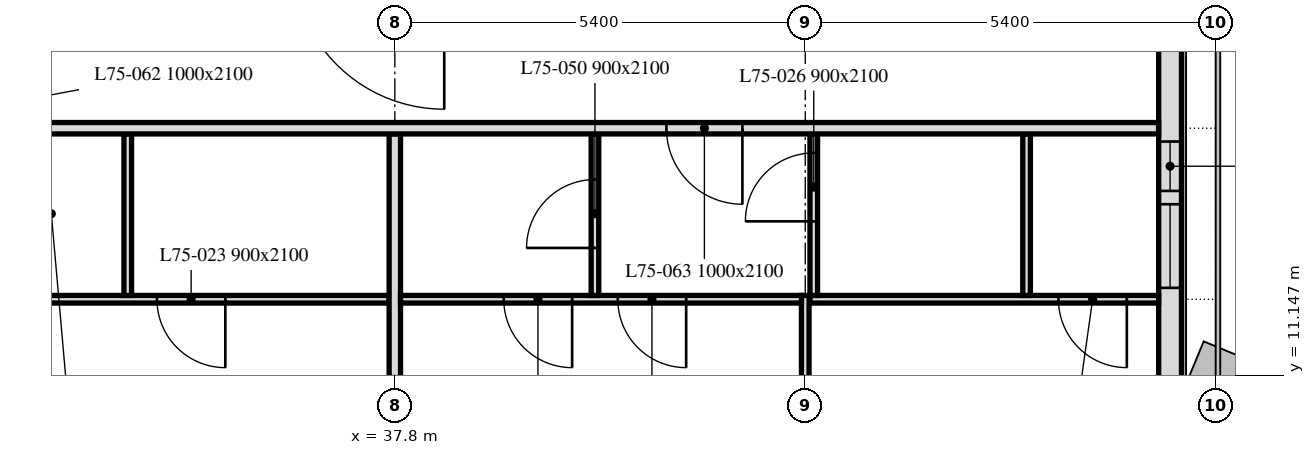
"""IFC4 building model, lengths in metres.
Left out: names, types, materials, properties, quantities, classifications, styles, units other than length and angle.
Written with IfcOpenShell. Run it as: python <this file> out.ifc"""

import sys

from ifc_helpers import new_model, si_unit, direction, frame, frame_2d, origin, place, context, subcontext, project, spatial, rectangle, extrude, element, fill, save


model = new_model("IFC4")
c1 = context("Model", 3, precision=1e-05, world=origin(), true_north=direction((0.0, 1.0)))
c2 = subcontext(c1, "Body", "Model", "MODEL_VIEW")
j1 = project(units=[si_unit("LENGTHUNIT", "METRE"), si_unit("PLANEANGLEUNIT", "RADIAN")], contexts=[c1])
p1 = place(None, origin())
s1 = spatial("IfcSite", under=j1, at=p1, CompositionType="ELEMENT")
p2 = place(p1, origin())
s2 = spatial("IfcBuilding", under=s1, at=p2, CompositionType="ELEMENT")
p3 = place(p2, frame((0.0, 0.0, 301.6)))
s3 = spatial("IfcBuildingStorey", under=s2, at=p3, CompositionType="ELEMENT", Elevation=301.6)
p4 = place(p3, frame((48.0, 10.986, 0.0), z_axis=(0.0, 0.0, 1.0), x_axis=(0.0, 1.0, 0.0)))
e1 = element("IfcWall", 1, at=p4, inside=s3, PredefinedType="SOLIDWALL", context=c2, shape_type="SweptSolid", body=[
    extrude(rectangle(XDim=32.027, YDim=0.3, at=frame_2d((16.014, 0.0))), origin(), (0.0, 0.0, 1.0), 3.0),
])
p5 = place(p4, frame((1.314, 0.0, 0.9)))
e2 = element("IfcOpeningElement", 2, at=p5, cuts=e1, PredefinedType="OPENING", context=c2, shape_type="SweptSolid", body=[
    extrude(rectangle(XDim=1.1, YDim=1.7, at=frame_2d((0.55, 0.85))), frame((0.0, 0.16, 0.0), z_axis=(0.0, -1.0, 0.0), x_axis=(1.0, 0.0, 0.0)), (0.0, 0.0, 1.0), 0.32),
])
p6 = place(p4, frame((2.589, 0.0, 0.9)))
e3 = element("IfcOpeningElement", 3, at=p6, cuts=e1, PredefinedType="OPENING", context=c2, shape_type="SweptSolid", body=[
    extrude(rectangle(XDim=0.65, YDim=1.7, at=frame_2d((0.325, 0.85))), frame((0.0, 0.16, 0.0), z_axis=(0.0, -1.0, 0.0), x_axis=(1.0, 0.0, 0.0)), (0.0, 0.0, 1.0), 0.32),
])
p7 = place(p4, frame((6.564, 0.0, 0.9)))
e4 = element("IfcOpeningElement", 4, at=p7, cuts=e1, PredefinedType="OPENING", context=c2, shape_type="SweptSolid", body=[
    extrude(rectangle(XDim=1.1, YDim=1.7, at=frame_2d((0.55, 0.85))), frame((0.0, 0.16, 0.0), z_axis=(0.0, -1.0, 0.0), x_axis=(1.0, 0.0, 0.0)), (0.0, 0.0, 1.0), 0.32),
])
p8 = place(p4, frame((8.164, 0.0, 0.9)))
e5 = element("IfcOpeningElement", 5, at=p8, cuts=e1, PredefinedType="OPENING", context=c2, shape_type="SweptSolid", body=[
    extrude(rectangle(XDim=1.1, YDim=1.7, at=frame_2d((0.55, 0.85))), frame((0.0, 0.16, 0.0), z_axis=(0.0, -1.0, 0.0), x_axis=(1.0, 0.0, 0.0)), (0.0, 0.0, 1.0), 0.32),
])
p9 = place(p4, frame((11.614, 0.0, 0.9)))
e6 = element("IfcOpeningElement", 6, at=p9, cuts=e1, PredefinedType="OPENING", context=c2, shape_type="SweptSolid", body=[
    extrude(rectangle(XDim=3.4, YDim=1.7, at=frame_2d((1.7, 0.85))), frame((0.0, 0.16, 0.0), z_axis=(0.0, -1.0, 0.0), x_axis=(1.0, 0.0, 0.0)), (0.0, 0.0, 1.0), 0.32),
])
p10 = place(p4, frame((17.364, 0.0, 0.9)))
e7 = element("IfcOpeningElement", 7, at=p10, cuts=e1, PredefinedType="OPENING", context=c2, shape_type="SweptSolid", body=[
    extrude(rectangle(XDim=1.1, YDim=1.7, at=frame_2d((0.55, 0.85))), frame((0.0, 0.16, 0.0), z_axis=(0.0, -1.0, 0.0), x_axis=(1.0, 0.0, 0.0)), (0.0, 0.0, 1.0), 0.32),
])
p11 = place(p4, frame((18.964, 0.0, 0.9)))
e8 = element("IfcOpeningElement", 8, at=p11, cuts=e1, PredefinedType="OPENING", context=c2, shape_type="SweptSolid", body=[
    extrude(rectangle(XDim=1.1, YDim=1.7, at=frame_2d((0.55, 0.85))), frame((0.0, 0.16, 0.0), z_axis=(0.0, -1.0, 0.0), x_axis=(1.0, 0.0, 0.0)), (0.0, 0.0, 1.0), 0.32),
])
p12 = place(p4, frame((23.389, 0.0, 0.9)))
e9 = element("IfcOpeningElement", 9, at=p12, cuts=e1, PredefinedType="OPENING", context=c2, shape_type="SweptSolid", body=[
    extrude(rectangle(XDim=0.65, YDim=1.7, at=frame_2d((0.325, 0.85))), frame((0.0, 0.16, 0.0), z_axis=(0.0, -1.0, 0.0), x_axis=(1.0, 0.0, 0.0)), (0.0, 0.0, 1.0), 0.32),
])
p13 = place(p4, frame((24.364, 0.0, 0.9)))
e10 = element("IfcOpeningElement", 10, at=p13, cuts=e1, PredefinedType="OPENING", context=c2, shape_type="SweptSolid", body=[
    extrude(rectangle(XDim=1.1, YDim=1.7, at=frame_2d((0.55, 0.85))), frame((0.0, 0.16, 0.0), z_axis=(0.0, -1.0, 0.0), x_axis=(1.0, 0.0, 0.0)), (0.0, 0.0, 1.0), 0.32),
])
p14 = place(p4, frame((28.164, 0.0, 0.9)))
e11 = element("IfcOpeningElement", 11, at=p14, cuts=e1, PredefinedType="OPENING", context=c2, shape_type="SweptSolid", body=[
    extrude(rectangle(XDim=1.1, YDim=1.7, at=frame_2d((0.55, 0.85))), frame((0.0, 0.16, 0.0), z_axis=(0.0, -1.0, 0.0), x_axis=(1.0, 0.0, 0.0)), (0.0, 0.0, 1.0), 0.32),
])
p15 = place(p4, frame((29.764, 0.0, 0.9)))
e12 = element("IfcOpeningElement", 12, at=p15, cuts=e1, PredefinedType="OPENING", context=c2, shape_type="SweptSolid", body=[
    extrude(rectangle(XDim=1.1, YDim=1.7, at=frame_2d((0.55, 0.85))), frame((0.0, 0.16, 0.0), z_axis=(0.0, -1.0, 0.0), x_axis=(1.0, 0.0, 0.0)), (0.0, 0.0, 1.0), 0.32),
])
p16 = place(p3, frame((37.725, 12.15, 0.0), z_axis=(0.0, 0.0, 1.0), x_axis=(-1.0, 0.0, 0.0)))
e13 = element("IfcWall", 13, at=p16, inside=s3, PredefinedType="PARTITIONING", context=c2, shape_type="SweptSolid", body=[
    extrude(rectangle(XDim=5.275, YDim=0.1, at=frame_2d((2.638, 0.0))), origin(), (0.0, 0.0, 1.0), 3.0),
])
p17 = place(p16, frame((2.155, 0.0, 0.0)))
e14 = element("IfcOpeningElement", 14, at=p17, cuts=e13, PredefinedType="OPENING", context=c2, shape_type="SweptSolid", body=[
    extrude(rectangle(XDim=0.9, YDim=2.1, at=frame_2d((0.45, 1.05))), frame((0.0, 0.05, 0.0), z_axis=(0.0, -1.0, 0.0), x_axis=(1.0, 0.0, 0.0)), (0.0, 0.0, 1.0), 0.1),
])
p18 = place(p3, frame((34.286, 12.2, 0.0), z_axis=(0.0, 0.0, 1.0), x_axis=(0.0, 1.0, 0.0)))
e15 = element("IfcWall", 15, at=p18, inside=s3, PredefinedType="PARTITIONING", context=c2, shape_type="SweptSolid", body=[
    extrude(rectangle(XDim=2.125, YDim=0.1, at=frame_2d((1.062, 0.0))), origin(), (0.0, 0.0, 1.0), 3.0),
])
p19 = place(p3, frame((37.8, 11.12, 0.0), z_axis=(0.0, 0.0, 1.0), x_axis=(0.0, 1.0, 0.0)))
e16 = element("IfcWall", 16, at=p19, inside=s3, PredefinedType="PARTITIONING", context=c2, shape_type="SweptSolid", body=[
    extrude(rectangle(XDim=3.205, YDim=0.15, at=frame_2d((1.603, 0.0))), origin(), (0.0, 0.0, 1.0), 3.0),
])
p20 = place(p3, frame((43.2, 11.12, 0.0), z_axis=(0.0, 0.0, 1.0), x_axis=(0.0, 1.0, 0.0)))
e17 = element("IfcWall", 17, at=p20, inside=s3, PredefinedType="PARTITIONING", context=c2, shape_type="SweptSolid", body=[
    extrude(rectangle(XDim=1.08, YDim=0.1, at=frame_2d((0.54, 0.0))), origin(), (0.0, 0.0, 1.0), 3.0),
])
p21 = place(p3, frame((43.15, 12.15, 0.0), z_axis=(0.0, 0.0, 1.0), x_axis=(-1.0, 0.0, 0.0)))
e18 = element("IfcWall", 18, at=p21, inside=s3, PredefinedType="PARTITIONING", context=c2, shape_type="SweptSolid", body=[
    extrude(rectangle(XDim=5.275, YDim=0.1, at=frame_2d((2.637, 0.0))), origin(), (0.0, 0.0, 1.0), 3.0),
])
p22 = place(p21, frame((3.017, 0.0, 0.0)))
e19 = element("IfcOpeningElement", 19, at=p22, cuts=e18, PredefinedType="OPENING", context=c2, shape_type="SweptSolid", body=[
    extrude(rectangle(XDim=0.9, YDim=2.1, at=frame_2d((0.45, 1.05))), frame((0.0, 0.05, 0.0), z_axis=(0.0, -1.0, 0.0), x_axis=(1.0, 0.0, 0.0)), (0.0, 0.0, 1.0), 0.1),
])
p23 = place(p21, frame((1.517, 0.0, 0.0)))
e20 = element("IfcOpeningElement", 20, at=p23, cuts=e18, PredefinedType="OPENING", context=c2, shape_type="SweptSolid", body=[
    extrude(rectangle(XDim=0.9, YDim=2.1, at=frame_2d((0.45, 1.05))), frame((0.0, 0.05, 0.0), z_axis=(0.0, -1.0, 0.0), x_axis=(1.0, 0.0, 0.0)), (0.0, 0.0, 1.0), 0.1),
])
p24 = place(p3, frame((47.849, 12.15, 0.0), z_axis=(0.0, 0.0, 1.0), x_axis=(-1.0, 0.0, 0.0)))
e21 = element("IfcWall", 21, at=p24, inside=s3, PredefinedType="PARTITIONING", context=c2, shape_type="SweptSolid", body=[
    extrude(rectangle(XDim=4.587, YDim=0.1, at=frame_2d((2.293, 0.0))), origin(), (0.0, 0.0, 1.0), 3.0),
])
p25 = place(p24, frame((0.418, 0.0, 0.0)))
e22 = element("IfcOpeningElement", 22, at=p25, cuts=e21, PredefinedType="OPENING", context=c2, shape_type="SweptSolid", body=[
    extrude(rectangle(XDim=0.9, YDim=2.1, at=frame_2d((0.45, 1.05))), frame((0.0, 0.05, 0.0), z_axis=(0.0, -1.0, 0.0), x_axis=(1.0, 0.0, 0.0)), (0.0, 0.0, 1.0), 0.1),
])
p26 = place(p3, frame((40.433, 12.2, 0.0), z_axis=(0.0, 0.0, 1.0), x_axis=(0.0, 1.0, 0.0)))
e23 = element("IfcWall", 23, at=p26, inside=s3, PredefinedType="PARTITIONING", context=c2, shape_type="SweptSolid", body=[
    extrude(rectangle(XDim=2.125, YDim=0.1, at=frame_2d((1.062, 0.0))), origin(), (0.0, 0.0, 1.0), 3.0),
])
p27 = place(p26, frame((0.625, 0.0, 0.0)))
e24 = element("IfcOpeningElement", 24, at=p27, cuts=e23, PredefinedType="OPENING", context=c2, shape_type="SweptSolid", body=[
    extrude(rectangle(XDim=0.9, YDim=2.1, at=frame_2d((0.45, 1.05))), frame((0.0, 0.05, 0.0), z_axis=(0.0, -1.0, 0.0), x_axis=(1.0, 0.0, 0.0)), (0.0, 0.0, 1.0), 0.1),
])
p28 = place(p3, frame((43.312, 12.2, 0.0), z_axis=(0.0, 0.0, 1.0), x_axis=(0.0, 1.0, 0.0)))
e25 = element("IfcWall", 25, at=p28, inside=s3, PredefinedType="PARTITIONING", context=c2, shape_type="SweptSolid", body=[
    extrude(rectangle(XDim=2.125, YDim=0.1, at=frame_2d((1.062, 0.0))), origin(), (0.0, 0.0, 1.0), 3.0),
])
p29 = place(p28, frame((0.975, 0.0, 0.0)))
e26 = element("IfcOpeningElement", 26, at=p29, cuts=e25, PredefinedType="OPENING", context=c2, shape_type="SweptSolid", body=[
    extrude(rectangle(XDim=0.9, YDim=2.1, at=frame_2d((0.45, 1.05))), frame((0.0, 0.05, 0.0), z_axis=(0.0, -1.0, 0.0), x_axis=(1.0, 0.0, 0.0)), (0.0, 0.0, 1.0), 0.1),
])
p30 = place(p3, frame((46.112, 12.2, 0.0), z_axis=(0.0, 0.0, 1.0), x_axis=(0.0, 1.0, 0.0)))
e27 = element("IfcWall", 27, at=p30, inside=s3, PredefinedType="PARTITIONING", context=c2, shape_type="SweptSolid", body=[
    extrude(rectangle(XDim=2.125, YDim=0.1, at=frame_2d((1.062, 0.0))), origin(), (0.0, 0.0, 1.0), 3.0),
])
p31 = place(p3, frame((47.849, 14.4, 0.0), z_axis=(0.0, 0.0, 1.0), x_axis=(-1.0, 0.0, 0.0)))
e28 = element("IfcWall", 28, at=p31, inside=s3, PredefinedType="PARTITIONING", context=c2, shape_type="SweptSolid", body=[
    extrude(rectangle(XDim=41.698, YDim=0.15, at=frame_2d((20.849, 0.0))), origin(), (0.0, 0.0, 1.0), 3.0),
])
p32 = place(p31, frame((38.179, 0.0, 0.0)))
e29 = element("IfcOpeningElement", 29, at=p32, cuts=e28, PredefinedType="OPENING", context=c2, shape_type="SweptSolid", body=[
    extrude(rectangle(XDim=1.0, YDim=2.1, at=frame_2d((0.5, 1.05))), frame((0.0, 0.075, 0.0), z_axis=(0.0, -1.0, 0.0), x_axis=(1.0, 0.0, 0.0)), (0.0, 0.0, 1.0), 0.15),
])
p33 = place(p31, frame((27.977, 0.0, 0.0)))
e30 = element("IfcOpeningElement", 30, at=p33, cuts=e28, PredefinedType="OPENING", context=c2, shape_type="SweptSolid", body=[
    extrude(rectangle(XDim=1.0, YDim=2.1, at=frame_2d((0.5, 1.05))), frame((0.0, 0.075, 0.0), z_axis=(0.0, -1.0, 0.0), x_axis=(1.0, 0.0, 0.0)), (0.0, 0.0, 1.0), 0.15),
])
p34 = place(p31, frame((16.399, 0.0, 0.0)))
e31 = element("IfcOpeningElement", 31, at=p34, cuts=e28, PredefinedType="OPENING", context=c2, shape_type="SweptSolid", body=[
    extrude(rectangle(XDim=1.0, YDim=2.1, at=frame_2d((0.5, 1.05))), frame((0.0, 0.075, 0.0), z_axis=(0.0, -1.0, 0.0), x_axis=(1.0, 0.0, 0.0)), (0.0, 0.0, 1.0), 0.15),
])
p35 = place(p31, frame((5.476, 0.0, 0.0)))
e32 = element("IfcOpeningElement", 32, at=p35, cuts=e28, PredefinedType="OPENING", context=c2, shape_type="SweptSolid", body=[
    extrude(rectangle(XDim=1.0, YDim=2.1, at=frame_2d((0.5, 1.05))), frame((0.0, 0.075, 0.0), z_axis=(0.0, -1.0, 0.0), x_axis=(1.0, 0.0, 0.0)), (0.0, 0.0, 1.0), 0.15),
])
p36 = place(p5, origin())
e33 = element("IfcWindow", 33, at=p36, inside=s3, PartitioningType="SINGLE_PANEL", PredefinedType="WINDOW", context=c2, shape_type="SweptSolid", body=[
    extrude(rectangle(XDim=1.1, YDim=1.7, at=frame_2d((0.55, 0.85))), frame((0.0, 0.03, 0.0), z_axis=(0.0, -1.0, 0.0), x_axis=(1.0, 0.0, 0.0)), (0.0, 0.0, 1.0), 0.06),
])
fill(e2, e33)
p37 = place(p6, origin())
e34 = element("IfcWindow", 34, at=p37, inside=s3, PartitioningType="SINGLE_PANEL", PredefinedType="WINDOW", context=c2, shape_type="SweptSolid", body=[
    extrude(rectangle(XDim=0.65, YDim=1.7, at=frame_2d((0.325, 0.85))), frame((0.0, 0.03, 0.0), z_axis=(0.0, -1.0, 0.0), x_axis=(1.0, 0.0, 0.0)), (0.0, 0.0, 1.0), 0.06),
])
fill(e3, e34)
p38 = place(p17, origin())
e35 = element("IfcDoor", 35, at=p38, inside=s3, OperationType="SINGLE_SWING_RIGHT", PredefinedType="DOOR", context=c2, shape_type="SweptSolid", body=[
    extrude(rectangle(XDim=0.9, YDim=2.1, at=frame_2d((0.45, 1.05))), frame((0.0, 0.025, 0.0), z_axis=(0.0, -1.0, 0.0), x_axis=(1.0, 0.0, 0.0)), (0.0, 0.0, 1.0), 0.05),
])
fill(e14, e35)
p39 = place(p25, origin())
e36 = element("IfcDoor", 36, at=p39, inside=s3, OperationType="SINGLE_SWING_LEFT", PredefinedType="DOOR", context=c2, shape_type="SweptSolid", body=[
    extrude(rectangle(XDim=0.9, YDim=2.1, at=frame_2d((0.45, 1.05))), frame((0.0, 0.025, 0.0), z_axis=(0.0, -1.0, 0.0), x_axis=(1.0, 0.0, 0.0)), (0.0, 0.0, 1.0), 0.05),
])
fill(e22, e36)
p40 = place(p29, origin())
e37 = element("IfcDoor", 37, at=p40, inside=s3, OperationType="SINGLE_SWING_LEFT", PredefinedType="DOOR", context=c2, shape_type="SweptSolid", body=[
    extrude(rectangle(XDim=0.9, YDim=2.1, at=frame_2d((0.45, 1.05))), frame((0.0, 0.025, 0.0), z_axis=(0.0, -1.0, 0.0), x_axis=(1.0, 0.0, 0.0)), (0.0, 0.0, 1.0), 0.05),
])
fill(e26, e37)
p41 = place(p22, origin())
e38 = element("IfcDoor", 38, at=p41, inside=s3, OperationType="SINGLE_SWING_RIGHT", PredefinedType="DOOR", context=c2, shape_type="SweptSolid", body=[
    extrude(rectangle(XDim=0.9, YDim=2.1, at=frame_2d((0.45, 1.05))), frame((0.0, 0.025, 0.0), z_axis=(0.0, -1.0, 0.0), x_axis=(1.0, 0.0, 0.0)), (0.0, 0.0, 1.0), 0.05),
])
fill(e19, e38)
p42 = place(p27, origin())
e39 = element("IfcDoor", 39, at=p42, inside=s3, OperationType="SINGLE_SWING_LEFT", PredefinedType="DOOR", context=c2, shape_type="SweptSolid", body=[
    extrude(rectangle(XDim=0.9, YDim=2.1, at=frame_2d((0.45, 1.05))), frame((0.0, 0.025, 0.0), z_axis=(0.0, -1.0, 0.0), x_axis=(1.0, 0.0, 0.0)), (0.0, 0.0, 1.0), 0.05),
])
fill(e24, e39)
p43 = place(p23, origin())
e40 = element("IfcDoor", 40, at=p43, inside=s3, OperationType="SINGLE_SWING_LEFT", PredefinedType="DOOR", context=c2, shape_type="SweptSolid", body=[
    extrude(rectangle(XDim=0.9, YDim=2.1, at=frame_2d((0.45, 1.05))), frame((0.0, 0.025, 0.0), z_axis=(0.0, -1.0, 0.0), x_axis=(1.0, 0.0, 0.0)), (0.0, 0.0, 1.0), 0.05),
])
fill(e20, e40)
p44 = place(p35, origin())
e41 = element("IfcDoor", 41, at=p44, inside=s3, OperationType="SINGLE_SWING_LEFT", PredefinedType="DOOR", context=c2, shape_type="SweptSolid", body=[
    extrude(rectangle(XDim=1.0, YDim=2.1, at=frame_2d((0.5, 1.05))), frame((0.0, 0.025, 0.0), z_axis=(0.0, -1.0, 0.0), x_axis=(1.0, 0.0, 0.0)), (0.0, 0.0, 1.0), 0.05),
])
fill(e32, e41)
save(model, sys.argv[1])
